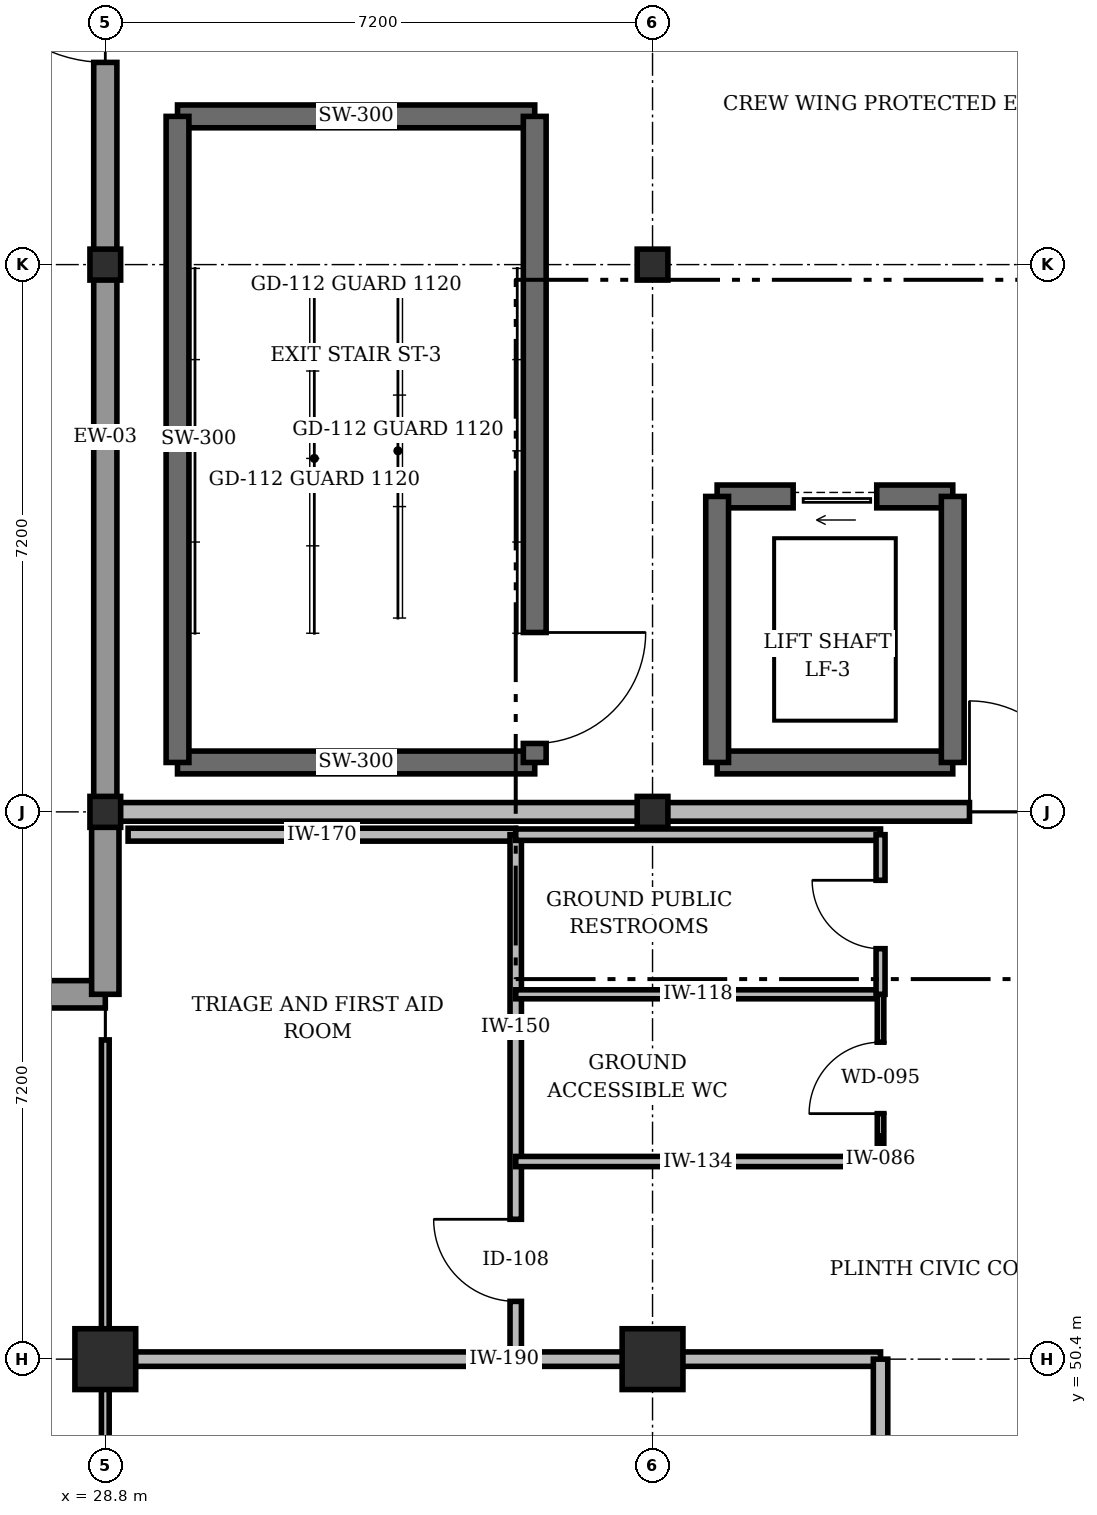
"""IFC4 building model, lengths in metres.
Left out: names, types, materials, properties, quantities, classifications, styles, units other than length and angle.
Written with IfcOpenShell. Run it as: python <this file> out.ifc"""

import sys

from ifc_helpers import new_model, si_unit, direction, frame, frame_2d, origin, origin_2d, place, context, subcontext, project, spatial, rectangle, i_section, extrude, element, fill, save


model = new_model("IFC4")
c1 = context("Model", 3, precision=1e-05, world=origin(), true_north=direction((0.0, 1.0)))
c2 = subcontext(c1, "Body", "Model", "MODEL_VIEW")
j1 = project(units=[si_unit("LENGTHUNIT", "METRE"), si_unit("PLANEANGLEUNIT", "RADIAN")], contexts=[c1])
p1 = place(None, origin())
s1 = spatial("IfcSite", under=j1, at=p1, CompositionType="ELEMENT")
p2 = place(p1, origin())
s2 = spatial("IfcBuilding", under=s1, at=p2, CompositionType="ELEMENT")
p3 = place(p2, origin())
s3 = spatial("IfcBuildingStorey", under=s2, at=p3, CompositionType="ELEMENT", Elevation=0.0)
p4 = place(p3, frame((28.8, 50.4, 0.0), z_axis=(0.0, 0.0, 1.0), x_axis=(1.0, 0.0, 0.0)))
e1 = element("IfcColumn", 1, at=p4, inside=s3, PredefinedType="COLUMN", context=c2, shape_type="SweptSolid", body=[
    extrude(rectangle(XDim=0.8, YDim=0.8, at=origin_2d()), origin(), (0.0, 0.0, 1.0), 6.0),
])
for number, where, z_axis, x_axis in (
    (2, (28.8, 57.6, 0.0), (0.0, 0.0, 1.0), (1.0, 0.0, 0.0)),
    (3, (28.8, 64.8, 0.0), (0.0, 0.0, 1.0), (1.0, 0.0, 0.0)),
):
    element("IfcColumn", number, at=place(p3, frame(where, z_axis=z_axis, x_axis=x_axis)), inside=s3, PredefinedType="COLUMN", context=c2, shape_type="SweptSolid", body=[
        extrude(i_section(OverallWidth=0.404, OverallDepth=0.407, WebThickness=0.027, FlangeThickness=0.044, at=origin_2d()), origin(), (0.0, 0.0, 1.0), 6.0),
    ])
p5 = place(p3, frame((36.0, 50.4, 0.0), z_axis=(0.0, 0.0, 1.0), x_axis=(1.0, 0.0, 0.0)))
e4 = element("IfcColumn", 4, at=p5, inside=s3, PredefinedType="COLUMN", context=c2, shape_type="SweptSolid", body=[
    extrude(rectangle(XDim=0.8, YDim=0.8, at=origin_2d()), origin(), (0.0, 0.0, 1.0), 6.0),
])
for number, where, z_axis, x_axis in (
    (5, (36.0, 57.6, 0.0), (0.0, 0.0, 1.0), (1.0, 0.0, 0.0)),
    (6, (36.0, 64.8, 0.0), (0.0, 0.0, 1.0), (1.0, 0.0, 0.0)),
):
    element("IfcColumn", number, at=place(p3, frame(where, z_axis=z_axis, x_axis=x_axis)), inside=s3, PredefinedType="COLUMN", context=c2, shape_type="SweptSolid", body=[
        extrude(i_section(OverallWidth=0.404, OverallDepth=0.407, WebThickness=0.027, FlangeThickness=0.044, at=origin_2d()), origin(), (0.0, 0.0, 1.0), 6.0),
    ])
p6 = place(p3, frame((28.8, 55.2, 0.0), z_axis=(0.0, 0.0, 1.0), x_axis=(-1.0, 0.0, 0.0)))
e7 = element("IfcWall", 7, at=p6, inside=s3, PredefinedType="STANDARD", context=c2, shape_type="SweptSolid", body=[
    extrude(rectangle(XDim=4.8, YDim=0.36, at=frame_2d((2.4, 0.0))), origin(), (0.0, 0.0, 1.0), 5.08),
])
p7 = place(p3, frame((28.8, 57.6, 0.0), z_axis=(0.0, 0.0, 1.0), x_axis=(0.0, -1.0, 0.0)))
e8 = element("IfcWall", 8, at=p7, inside=s3, PredefinedType="STANDARD", context=c2, shape_type="SweptSolid", body=[
    extrude(rectangle(XDim=2.4, YDim=0.36, at=frame_2d((1.2, 0.0))), origin(), (0.0, 0.0, 1.0), 5.022),
])
p8 = place(p3, frame((28.8, 57.6, 0.0), z_axis=(0.0, 0.0, 1.0), x_axis=(0.0, 1.0, 0.0)))
e9 = element("IfcWall", 9, at=p8, inside=s3, PredefinedType="STANDARD", context=c2, shape_type="SweptSolid", body=[
    extrude(rectangle(XDim=28.8, YDim=0.305, at=frame_2d((14.4, 0.0))), origin(), (0.0, 0.0, 1.0), 5.022),
])
p9 = place(p8, frame((9.86, 0.0, 0.0)))
e10 = element("IfcOpeningElement", 10, at=p9, cuts=e9, PredefinedType="OPENING", context=c2, shape_type="SweptSolid", body=[
    extrude(rectangle(XDim=1.88, YDim=2.36, at=frame_2d((0.94, 1.18))), frame((0.0, 0.162, 0.0), z_axis=(0.0, -1.0, 0.0), x_axis=(1.0, 0.0, 0.0)), (0.0, 0.0, 1.0), 0.325),
])
p10 = place(p8, frame((23.94, 0.0, 1.15)))
e11 = element("IfcOpeningElement", 11, at=p10, cuts=e9, PredefinedType="OPENING", context=c2, shape_type="SweptSolid", body=[
    extrude(rectangle(XDim=1.86, YDim=1.68, at=frame_2d((0.93, 0.84))), frame((0.0, 0.162, 0.0), z_axis=(0.0, -1.0, 0.0), x_axis=(1.0, 0.0, 0.0)), (0.0, 0.0, 1.0), 0.325),
])
p11 = place(p8, frame((15.0, 0.0, 1.15)))
e12 = element("IfcOpeningElement", 12, at=p11, cuts=e9, PredefinedType="OPENING", context=c2, shape_type="SweptSolid", body=[
    extrude(rectangle(XDim=1.74, YDim=1.64, at=frame_2d((0.87, 0.82))), frame((0.0, 0.162, 0.0), z_axis=(0.0, -1.0, 0.0), x_axis=(1.0, 0.0, 0.0)), (0.0, 0.0, 1.0), 0.325),
])
p12 = place(p8, frame((17.8, 0.0, 1.15)))
e13 = element("IfcOpeningElement", 13, at=p12, cuts=e9, PredefinedType="OPENING", context=c2, shape_type="SweptSolid", body=[
    extrude(rectangle(XDim=1.62, YDim=1.6, at=frame_2d((0.81, 0.8))), frame((0.0, 0.162, 0.0), z_axis=(0.0, -1.0, 0.0), x_axis=(1.0, 0.0, 0.0)), (0.0, 0.0, 1.0), 0.325),
])
for number, where, z_axis, x_axis in (
    (14, (29.75, 58.25, 0.0), (0.0, 0.0, 1.0), (1.0, 0.0, 0.0)),
    (15, (34.45, 66.75, 0.0), (0.0, 0.0, 1.0), (-1.0, 0.0, 0.0)),
):
    element("IfcWall", number, at=place(p3, frame(where, z_axis=z_axis, x_axis=x_axis)), inside=s3, PredefinedType="SHEAR", context=c2, shape_type="SweptSolid", body=[
        extrude(rectangle(XDim=4.7, YDim=0.3, at=frame_2d((2.35, 0.0))), origin(), (0.0, 0.0, 1.0), 5.715),
    ])
p13 = place(p3, frame((29.75, 58.25, 0.0), z_axis=(0.0, 0.0, 1.0), x_axis=(0.0, 1.0, 0.0)))
e16 = element("IfcWall", 16, at=p13, inside=s3, PredefinedType="SHEAR", context=c2, shape_type="SweptSolid", body=[
    extrude(rectangle(XDim=8.5, YDim=0.3, at=frame_2d((4.25, 0.0))), origin(), (0.0, 0.0, 1.0), 5.715),
])
p14 = place(p3, frame((34.45, 66.75, 0.0), z_axis=(0.0, 0.0, 1.0), x_axis=(0.0, -1.0, 0.0)))
e17 = element("IfcWall", 17, at=p14, inside=s3, PredefinedType="SHEAR", context=c2, shape_type="SweptSolid", body=[
    extrude(rectangle(XDim=8.5, YDim=0.3, at=frame_2d((4.25, 0.0))), origin(), (0.0, 0.0, 1.0), 5.715),
])
p15 = place(p14, frame((6.79, 0.0, 0.0)))
e18 = element("IfcOpeningElement", 18, at=p15, cuts=e17, PredefinedType="OPENING", context=c2, shape_type="SweptSolid", body=[
    extrude(rectangle(XDim=1.46, YDim=2.24, at=frame_2d((0.73, 1.12))), frame((0.0, 0.16, 0.0), z_axis=(0.0, -1.0, 0.0), x_axis=(1.0, 0.0, 0.0)), (0.0, 0.0, 1.0), 0.32),
])
p16 = place(p3, frame((36.85, 58.25, 0.0), z_axis=(0.0, 0.0, 1.0), x_axis=(1.0, 0.0, 0.0)))
e19 = element("IfcWall", 19, at=p16, inside=s3, PredefinedType="SHEAR", context=c2, shape_type="SweptSolid", body=[
    extrude(rectangle(XDim=3.1, YDim=0.3, at=frame_2d((1.55, 0.0))), origin(), (0.0, 0.0, 1.0), 5.715),
])
p17 = place(p3, frame((39.95, 61.75, 0.0), z_axis=(0.0, 0.0, 1.0), x_axis=(-1.0, 0.0, 0.0)))
e20 = element("IfcWall", 20, at=p17, inside=s3, PredefinedType="SHEAR", context=c2, shape_type="SweptSolid", body=[
    extrude(rectangle(XDim=3.1, YDim=0.3, at=frame_2d((1.55, 0.0))), origin(), (0.0, 0.0, 1.0), 5.715),
])
p18 = place(p17, frame((1.0, 0.0, 0.0)))
e21 = element("IfcOpeningElement", 21, at=p18, cuts=e20, PredefinedType="OPENING", context=c2, shape_type="SweptSolid", body=[
    extrude(rectangle(XDim=1.1, YDim=2.22, at=frame_2d((0.55, 1.11))), frame((0.0, 0.16, 0.0), z_axis=(0.0, -1.0, 0.0), x_axis=(1.0, 0.0, 0.0)), (0.0, 0.0, 1.0), 0.32),
])
for number, where, z_axis, x_axis in (
    (22, (36.85, 61.75, 0.0), (0.0, 0.0, 1.0), (0.0, -1.0, 0.0)),
    (23, (39.95, 58.25, 0.0), (0.0, 0.0, 1.0), (0.0, 1.0, 0.0)),
):
    element("IfcWall", number, at=place(p3, frame(where, z_axis=z_axis, x_axis=x_axis)), inside=s3, PredefinedType="SHEAR", context=c2, shape_type="SweptSolid", body=[
        extrude(rectangle(XDim=3.5, YDim=0.3, at=frame_2d((1.75, 0.0))), origin(), (0.0, 0.0, 1.0), 5.715),
    ])
p19 = place(p3, frame((28.8, 57.6, 0.0), z_axis=(0.0, 0.0, 1.0), x_axis=(1.0, 0.0, 0.0)))
e24 = element("IfcWall", 24, at=p19, inside=s3, PredefinedType="STANDARD", context=c2, shape_type="SweptSolid", body=[
    extrude(rectangle(XDim=28.8, YDim=0.245, at=frame_2d((14.4, 0.0))), origin(), (0.0, 0.0, 1.0), 5.022),
])
p20 = place(p19, frame((11.37, 0.0, 0.0)))
e25 = element("IfcOpeningElement", 25, at=p20, cuts=e24, PredefinedType="OPENING", context=c2, shape_type="SweptSolid", body=[
    extrude(rectangle(XDim=1.46, YDim=2.26, at=frame_2d((0.73, 1.13))), frame((0.0, 0.133, 0.0), z_axis=(0.0, -1.0, 0.0), x_axis=(1.0, 0.0, 0.0)), (0.0, 0.0, 1.0), 0.265),
])
p21 = place(p3, frame((28.8, 31.2, 0.0), z_axis=(0.0, 0.0, 1.0), x_axis=(0.0, 1.0, 0.0)))
e26 = element("IfcWall", 26, at=p21, inside=s3, PredefinedType="STANDARD", context=c2, shape_type="SweptSolid", body=[
    extrude(rectangle(XDim=23.4, YDim=0.102, at=frame_2d((11.7, 0.0))), origin(), (0.0, 0.0, 1.0), 5.022),
])
p22 = place(p21, frame((14.73, 0.0, 0.0)))
e27 = element("IfcOpeningElement", 27, at=p22, cuts=e26, PredefinedType="OPENING", context=c2, shape_type="SweptSolid", body=[
    extrude(rectangle(XDim=1.74, YDim=2.34, at=frame_2d((0.87, 1.17))), frame((0.0, 0.061, 0.0), z_axis=(0.0, -1.0, 0.0), x_axis=(1.0, 0.0, 0.0)), (0.0, 0.0, 1.0), 0.122),
])
p23 = place(p3, frame((39.0, 50.4, 0.0), z_axis=(0.0, 0.0, 1.0), x_axis=(-1.0, 0.0, 0.0)))
e28 = element("IfcWall", 28, at=p23, inside=s3, PredefinedType="STANDARD", context=c2, shape_type="SweptSolid", body=[
    extrude(rectangle(XDim=9.9, YDim=0.19, at=frame_2d((4.95, 0.0))), origin(), (0.0, 0.0, 1.0), 5.022),
])
p24 = place(p3, frame((39.0, 39.6, 0.0), z_axis=(0.0, 0.0, 1.0), x_axis=(0.0, 1.0, 0.0)))
e29 = element("IfcWall", 29, at=p24, inside=s3, PredefinedType="STANDARD", context=c2, shape_type="SweptSolid", body=[
    extrude(rectangle(XDim=10.8, YDim=0.19, at=frame_2d((5.4, 0.0))), origin(), (0.0, 0.0, 1.0), 5.022),
])
p25 = place(p24, frame((6.6, 0.0, 0.0)))
e30 = element("IfcOpeningElement", 30, at=p25, cuts=e29, PredefinedType="OPENING", context=c2, shape_type="SweptSolid", body=[
    extrude(rectangle(XDim=1.2, YDim=2.2, at=frame_2d((0.6, 1.1))), frame((0.0, 0.105, 0.0), z_axis=(0.0, -1.0, 0.0), x_axis=(1.0, 0.0, 0.0)), (0.0, 0.0, 1.0), 0.21),
])
p26 = place(p3, frame((34.2, 57.3, 0.0), z_axis=(0.0, 0.0, 1.0), x_axis=(-1.0, 0.0, 0.0)))
e31 = element("IfcWall", 31, at=p26, inside=s3, PredefinedType="STANDARD", context=c2, shape_type="SweptSolid", body=[
    extrude(rectangle(XDim=5.1, YDim=0.17, at=frame_2d((2.55, 0.0))), origin(), (0.0, 0.0, 1.0), 5.258),
])
p27 = place(p3, frame((34.2, 50.4, 0.0), z_axis=(0.0, 0.0, 1.0), x_axis=(0.0, 1.0, 0.0)))
e32 = element("IfcWall", 32, at=p27, inside=s3, PredefinedType="STANDARD", context=c2, shape_type="SweptSolid", body=[
    extrude(rectangle(XDim=6.9, YDim=0.15, at=frame_2d((3.45, 0.0))), origin(), (0.0, 0.0, 1.0), 5.022),
])
p28 = place(p27, frame((0.76, 0.0, 0.0)))
e33 = element("IfcOpeningElement", 33, at=p28, cuts=e32, PredefinedType="OPENING", context=c2, shape_type="SweptSolid", body=[
    extrude(rectangle(XDim=1.08, YDim=2.18, at=frame_2d((0.54, 1.09))), frame((0.0, 0.085, 0.0), z_axis=(0.0, -1.0, 0.0), x_axis=(1.0, 0.0, 0.0)), (0.0, 0.0, 1.0), 0.17),
])
p29 = place(p3, frame((34.2, 53.0, 0.0), z_axis=(0.0, 0.0, 1.0), x_axis=(1.0, 0.0, 0.0)))
e34 = element("IfcWall", 34, at=p29, inside=s3, PredefinedType="STANDARD", context=c2, shape_type="SweptSolid", body=[
    extrude(rectangle(XDim=4.8, YDim=0.134, at=frame_2d((2.4, 0.0))), origin(), (0.0, 0.0, 1.0), 5.103),
])
p30 = place(p3, frame((39.0, 55.2, 0.0), z_axis=(0.0, 0.0, 1.0), x_axis=(-1.0, 0.0, 0.0)))
e35 = element("IfcWall", 35, at=p30, inside=s3, PredefinedType="STANDARD", context=c2, shape_type="SweptSolid", body=[
    extrude(rectangle(XDim=4.8, YDim=0.118, at=frame_2d((2.4, 0.0))), origin(), (0.0, 0.0, 1.0), 5.103),
])
p31 = place(p3, frame((39.0, 53.0, 0.0), z_axis=(0.0, 0.0, 1.0), x_axis=(0.0, 1.0, 0.0)))
e36 = element("IfcWall", 36, at=p31, inside=s3, PredefinedType="STANDARD", context=c2, shape_type="SweptSolid", body=[
    extrude(rectangle(XDim=2.2, YDim=0.086, at=frame_2d((1.1, 0.0))), origin(), (0.0, 0.0, 1.0), 5.715),
])
p32 = place(p31, frame((0.63, 0.0, 0.0)))
e37 = element("IfcOpeningElement", 37, at=p32, cuts=e36, PredefinedType="OPENING", context=c2, shape_type="SweptSolid", body=[
    extrude(rectangle(XDim=0.94, YDim=2.12, at=frame_2d((0.47, 1.06))), frame((0.0, 0.053, 0.0), z_axis=(0.0, -1.0, 0.0), x_axis=(1.0, 0.0, 0.0)), (0.0, 0.0, 1.0), 0.106),
])
p33 = place(p3, frame((39.0, 57.3, 0.0), z_axis=(0.0, 0.0, 1.0), x_axis=(-1.0, 0.0, 0.0)))
e38 = element("IfcWall", 38, at=p33, inside=s3, PredefinedType="STANDARD", context=c2, shape_type="SweptSolid", body=[
    extrude(rectangle(XDim=4.8, YDim=0.15, at=frame_2d((2.4, 0.0))), origin(), (0.0, 0.0, 1.0), 5.103),
])
p34 = place(p3, frame((39.0, 55.2, 0.0), z_axis=(0.0, 0.0, 1.0), x_axis=(0.0, 1.0, 0.0)))
e39 = element("IfcWall", 39, at=p34, inside=s3, PredefinedType="STANDARD", context=c2, shape_type="SweptSolid", body=[
    extrude(rectangle(XDim=2.1, YDim=0.118, at=frame_2d((1.05, 0.0))), origin(), (0.0, 0.0, 1.0), 5.715),
])
p35 = place(p34, frame((0.6, 0.0, 0.0)))
e40 = element("IfcOpeningElement", 40, at=p35, cuts=e39, PredefinedType="OPENING", context=c2, shape_type="SweptSolid", body=[
    extrude(rectangle(XDim=0.9, YDim=2.1, at=frame_2d((0.45, 1.05))), frame((0.0, 0.069, 0.0), z_axis=(0.0, -1.0, 0.0), x_axis=(1.0, 0.0, 0.0)), (0.0, 0.0, 1.0), 0.138),
])
p36 = place(p9, origin())
e41 = element("IfcDoor", 41, at=p36, inside=s3, OperationType="SINGLE_SWING_RIGHT", PredefinedType="DOOR", context=c2, shape_type="SweptSolid", body=[
    extrude(rectangle(XDim=1.88, YDim=2.36, at=frame_2d((0.94, 1.18))), frame((0.0, 0.025, 0.0), z_axis=(0.0, -1.0, 0.0), x_axis=(1.0, 0.0, 0.0)), (0.0, 0.0, 1.0), 0.05),
])
fill(e10, e41)
p37 = place(p15, origin())
e42 = element("IfcDoor", 42, at=p37, inside=s3, OperationType="SINGLE_SWING_LEFT", PredefinedType="DOOR", context=c2, shape_type="SweptSolid", body=[
    extrude(rectangle(XDim=1.46, YDim=2.24, at=frame_2d((0.73, 1.12))), frame((0.0, 0.025, 0.0), z_axis=(0.0, -1.0, 0.0), x_axis=(1.0, 0.0, 0.0)), (0.0, 0.0, 1.0), 0.05),
])
fill(e18, e42)
p38 = place(p18, origin())
e43 = element("IfcDoor", 43, at=p38, inside=s3, OperationType="SLIDING_TO_LEFT", PredefinedType="DOOR", context=c2, shape_type="SweptSolid", body=[
    extrude(rectangle(XDim=1.1, YDim=2.22, at=frame_2d((0.55, 1.11))), frame((0.0, 0.025, 0.0), z_axis=(0.0, -1.0, 0.0), x_axis=(1.0, 0.0, 0.0)), (0.0, 0.0, 1.0), 0.05),
])
fill(e21, e43)
p39 = place(p20, origin())
e44 = element("IfcDoor", 44, at=p39, inside=s3, OperationType="SINGLE_SWING_LEFT", PredefinedType="DOOR", context=c2, shape_type="SweptSolid", body=[
    extrude(rectangle(XDim=1.46, YDim=2.26, at=frame_2d((0.73, 1.13))), frame((0.0, 0.025, 0.0), z_axis=(0.0, -1.0, 0.0), x_axis=(1.0, 0.0, 0.0)), (0.0, 0.0, 1.0), 0.05),
])
fill(e25, e44)
p40 = place(p28, origin())
e45 = element("IfcDoor", 45, at=p40, inside=s3, OperationType="SINGLE_SWING_RIGHT", PredefinedType="DOOR", context=c2, shape_type="SweptSolid", body=[
    extrude(rectangle(XDim=1.08, YDim=2.18, at=frame_2d((0.54, 1.09))), frame((0.0, 0.025, 0.0), z_axis=(0.0, -1.0, 0.0), x_axis=(1.0, 0.0, 0.0)), (0.0, 0.0, 1.0), 0.05),
])
fill(e33, e45)
p41 = place(p32, origin())
e46 = element("IfcDoor", 46, at=p41, inside=s3, OperationType="SINGLE_SWING_LEFT", PredefinedType="DOOR", context=c2, shape_type="SweptSolid", body=[
    extrude(rectangle(XDim=0.94, YDim=2.12, at=frame_2d((0.47, 1.06))), frame((0.0, 0.025, 0.0), z_axis=(0.0, -1.0, 0.0), x_axis=(1.0, 0.0, 0.0)), (0.0, 0.0, 1.0), 0.05),
])
fill(e37, e46)
p42 = place(p35, origin())
e47 = element("IfcDoor", 47, at=p42, inside=s3, OperationType="SINGLE_SWING_RIGHT", PredefinedType="DOOR", context=c2, shape_type="SweptSolid", body=[
    extrude(rectangle(XDim=0.9, YDim=2.1, at=frame_2d((0.45, 1.05))), frame((0.0, 0.025, 0.0), z_axis=(0.0, -1.0, 0.0), x_axis=(1.0, 0.0, 0.0)), (0.0, 0.0, 1.0), 0.05),
])
fill(e40, e47)
save(model, sys.argv[1])
